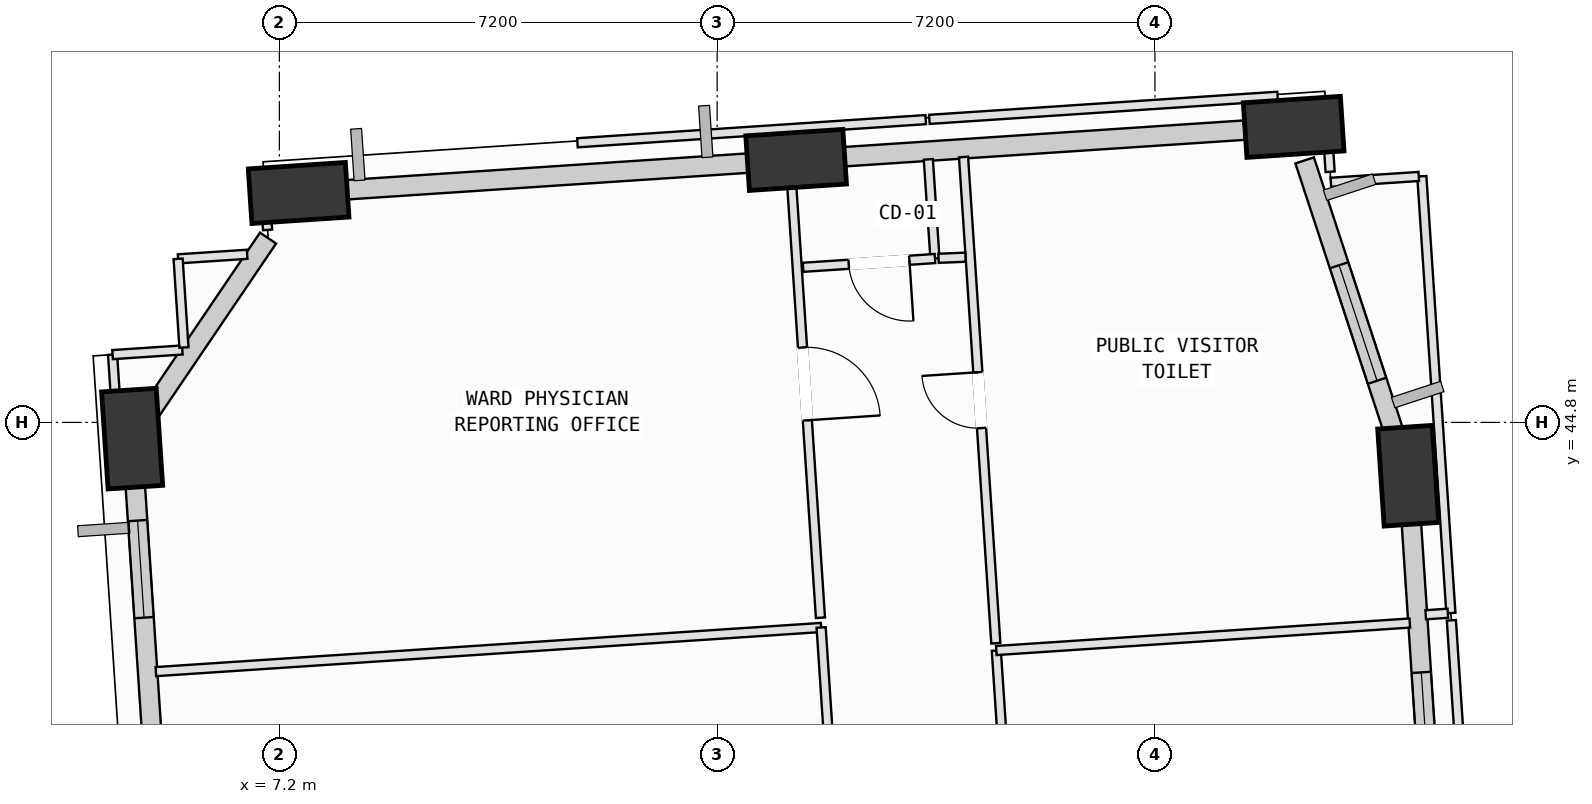
"""IFC4 building model, lengths in metres.
Left out: names, types, materials, properties, quantities, classifications, styles, units other than length and angle.
Written with IfcOpenShell. Run it as: python <this file> out.ifc"""

import sys

from ifc_helpers import new_model, si_unit, direction, frame, frame_2d, origin, origin_2d, place, context, subcontext, project, spatial, rectangle, extrude, element, fill, save


model = new_model("IFC4")
c1 = context("Model", 3, precision=1e-05, world=origin(), true_north=direction((0.0, 1.0)))
c2 = subcontext(c1, "Body", "Model", "MODEL_VIEW")
j1 = project(units=[si_unit("LENGTHUNIT", "METRE"), si_unit("PLANEANGLEUNIT", "RADIAN")], contexts=[c1])
p1 = place(None, origin())
s1 = spatial("IfcSite", under=j1, at=p1, CompositionType="ELEMENT")
p2 = place(p1, origin())
s2 = spatial("IfcBuilding", under=s1, at=p2, CompositionType="ELEMENT")
p3 = place(p2, frame((0.0, 0.0, 39.0)))
s3 = spatial("IfcBuildingStorey", under=s2, at=p3, CompositionType="ELEMENT", Elevation=39.0)
p4 = place(p3, frame((25.765, 43.923, 0.002), z_axis=(-0.078697694353, -0.033049379763, 0.996350546445), x_axis=(0.890951953445, 0.446039267367, 0.08516800232)))
e1 = element("IfcColumn", 1, at=p4, inside=s3, PredefinedType="COLUMN", context=c2, shape_type="SweptSolid", body=[
    extrude(rectangle(XDim=1.6, YDim=0.9, at=origin_2d()), origin(), (0.0, 0.0, 1.0), 4.011),
])
p5 = place(p3, frame((23.881, 49.66, 0.002), z_axis=(-0.102065358424, -0.040862573599, 0.993938082925), x_axis=(0.432012401952, -0.901838231222, 0.007286238123)))
e2 = element("IfcColumn", 2, at=p5, inside=s3, PredefinedType="COLUMN", context=c2, shape_type="SweptSolid", body=[
    extrude(rectangle(XDim=1.6, YDim=0.9, at=origin_2d()), origin(), (0.0, 0.0, 1.0), 4.021),
])
p6 = place(p3, frame((15.699, 49.117, 0.002), z_axis=(-0.099407727079, -0.074434566374, 0.992258836759), x_axis=(0.650696804167, -0.759293046403, 0.008230354175)))
e3 = element("IfcColumn", 3, at=p6, inside=s3, PredefinedType="COLUMN", context=c2, shape_type="SweptSolid", body=[
    extrude(rectangle(XDim=1.6, YDim=0.9, at=origin_2d()), origin(), (0.0, 0.0, 1.0), 4.028),
])
p7 = place(p3, frame((7.517, 48.573, 0.002), z_axis=(-0.096589910921, -0.107772097103, 0.989472366564), x_axis=(0.786813433781, -0.617116380957, 0.009591286496)))
e4 = element("IfcColumn", 4, at=p7, inside=s3, PredefinedType="COLUMN", context=c2, shape_type="SweptSolid", body=[
    extrude(rectangle(XDim=1.6, YDim=0.9, at=origin_2d()), origin(), (0.0, 0.0, 1.0), 4.039),
])
p8 = place(p3, frame((4.779, 44.533, 0.002), z_axis=(-0.079984869676, -0.118858846397, 0.989684290699), x_axis=(0.496340655848, 0.856277466215, 0.142950530621)))
e5 = element("IfcColumn", 5, at=p8, inside=s3, PredefinedType="COLUMN", context=c2, shape_type="SweptSolid", body=[
    extrude(rectangle(XDim=1.6, YDim=0.9, at=origin_2d()), origin(), (0.0, 0.0, 1.0), 4.038),
])
p9 = place(p3, frame((26.127, 38.477, 0.0), z_axis=(0.0, 0.0, 1.0), x_axis=(-0.066303684838, 0.997799489565, 0.0)))
e6 = element("IfcWall", 6, at=p9, inside=s3, PredefinedType="SOLIDWALL", context=c2, shape_type="SweptSolid", body=[
    extrude(rectangle(XDim=4.816, YDim=0.32, at=frame_2d((2.408, 0.0))), origin(), (0.0, 0.0, 1.0), 3.165),
])
p10 = place(p9, frame((0.616, 0.0, 0.75)))
e7 = element("IfcOpeningElement", 7, at=p10, cuts=e6, PredefinedType="OPENING", context=c2, shape_type="SweptSolid", body=[
    extrude(rectangle(XDim=1.6, YDim=1.95, at=frame_2d((0.8, 0.975))), frame((0.0, 0.17, 0.0), z_axis=(0.0, -1.0, 0.0), x_axis=(1.0, 0.0, 0.0)), (0.0, 0.0, 1.0), 0.34),
])
p11 = place(p3, frame((24.062, 49.109, 0.0), z_axis=(0.0, 0.0, 1.0), x_axis=(0.312045120055, -0.950067283433, 0.0)))
e8 = element("IfcWall", 8, at=p11, inside=s3, PredefinedType="SOLIDWALL", context=c2, shape_type="SweptSolid", body=[
    extrude(rectangle(XDim=4.889, YDim=0.32, at=frame_2d((2.445, 0.0))), origin(), (0.0, 0.0, 1.0), 3.165),
])
p12 = place(p11, frame((1.815, 0.0, 0.75)))
e9 = element("IfcOpeningElement", 9, at=p12, cuts=e8, PredefinedType="OPENING", context=c2, shape_type="SweptSolid", body=[
    extrude(rectangle(XDim=2.0, YDim=1.95, at=frame_2d((1.0, 0.975))), frame((0.0, 0.17, 0.0), z_axis=(0.0, -1.0, 0.0), x_axis=(1.0, 0.0, 0.0)), (0.0, 0.0, 1.0), 0.34),
])
p13 = place(p3, frame((16.081, 49.142, 0.0), z_axis=(0.0, 0.0, 1.0), x_axis=(0.997799173188, 0.066308445806, 0.0)))
e10 = element("IfcWall", 10, at=p13, inside=s3, PredefinedType="SOLIDWALL", context=c2, shape_type="SweptSolid", body=[
    extrude(rectangle(XDim=7.003, YDim=0.32, at=frame_2d((3.501, 0.0))), origin(), (0.0, 0.0, 1.0), 3.165),
])
p14 = place(p3, frame((7.879, 48.598, 0.0), z_axis=(0.0, 0.0, 1.0), x_axis=(0.997800640447, 0.066286363022, 0.0)))
e11 = element("IfcWall", 11, at=p14, inside=s3, PredefinedType="SOLIDWALL", context=c2, shape_type="SweptSolid", body=[
    extrude(rectangle(XDim=7.035, YDim=0.32, at=frame_2d((3.517, 0.0))), origin(), (0.0, 0.0, 1.0), 3.165),
])
p15 = place(p3, frame((4.958, 44.797, 0.0), z_axis=(0.0, 0.0, 1.0), x_axis=(0.561016004543, 0.827804954471, 0.0)))
e12 = element("IfcWall", 12, at=p15, inside=s3, PredefinedType="SOLIDWALL", context=c2, shape_type="SweptSolid", body=[
    extrude(rectangle(XDim=3.666, YDim=0.32, at=frame_2d((1.833, 0.0))), origin(), (0.0, 0.0, 1.0), 3.165),
])
p16 = place(p3, frame((5.179, 38.513, 0.0), z_axis=(0.0, 0.0, 1.0), x_axis=(-0.066280128143, 0.997801054626, 0.0)))
e13 = element("IfcWall", 13, at=p16, inside=s3, PredefinedType="SOLIDWALL", context=c2, shape_type="SweptSolid", body=[
    extrude(rectangle(XDim=5.223, YDim=0.32, at=frame_2d((2.612, 0.0))), origin(), (0.0, 0.0, 1.0), 3.165),
])
p17 = place(p16, frame((3.083, 0.0, 0.75)))
e14 = element("IfcOpeningElement", 14, at=p17, cuts=e13, PredefinedType="OPENING", context=c2, shape_type="SweptSolid", body=[
    extrude(rectangle(XDim=1.6, YDim=1.95, at=frame_2d((0.8, 0.975))), frame((0.0, 0.17, 0.0), z_axis=(0.0, -1.0, 0.0), x_axis=(1.0, 0.0, 0.0)), (0.0, 0.0, 1.0), 0.34),
])
p18 = place(p3, frame((5.169, 40.701, 0.0), z_axis=(0.0, 0.0, 1.0), x_axis=(0.997805307983, 0.066216065736, 0.0)))
e15 = element("IfcWall", 15, at=p18, inside=s3, PredefinedType="PARTITIONING", context=c2, shape_type="SweptSolid", body=[
    extrude(rectangle(XDim=10.965, YDim=0.15, at=frame_2d((5.483, 0.0))), origin(), (0.0, 0.0, 1.0), 3.78),
])
p19 = place(p3, frame((16.11, 41.427, 0.0), z_axis=(0.0, 0.0, 1.0), x_axis=(0.066170320126, -0.997808342686, 0.0)))
e16 = element("IfcWall", 16, at=p19, inside=s3, PredefinedType="PARTITIONING", context=c2, shape_type="SweptSolid", body=[
    extrude(rectangle(XDim=8.04, YDim=0.15, at=frame_2d((4.02, 0.0))), origin(), (0.0, 0.0, 1.0), 3.78),
])
p20 = place(p19, frame((3.42, 0.0, 0.0)))
e17 = element("IfcOpeningElement", 17, at=p20, cuts=e16, PredefinedType="OPENING", context=c2, shape_type="SweptSolid", body=[
    extrude(rectangle(XDim=1.2, YDim=2.15, at=frame_2d((0.6, 1.075))), frame((0.0, 0.085, 0.0), z_axis=(0.0, -1.0, 0.0), x_axis=(1.0, 0.0, 0.0)), (0.0, 0.0, 1.0), 0.17),
])
p21 = place(p3, frame((5.535, 47.49, 0.0), z_axis=(0.0, 0.0, 1.0), x_axis=(0.997826747849, 0.065892194362, 0.0)))
e18 = element("IfcWall", 18, at=p21, inside=s3, PredefinedType="PARTITIONING", context=c2, shape_type="SweptSolid", body=[
    extrude(rectangle(XDim=1.137, YDim=0.15, at=frame_2d((0.569, 0.0))), origin(), (0.0, 0.0, 1.0), 3.78),
])
p22 = place(p3, frame((7.006, 47.966, 0.0), z_axis=(0.0, 0.0, 1.0), x_axis=(-0.066082585029, 0.997814157023, 0.0)))
e19 = element("IfcWall", 19, at=p22, inside=s3, PredefinedType="PARTITIONING", context=c2, shape_type="SweptSolid", body=[
    extrude(rectangle(XDim=0.743, YDim=0.15, at=frame_2d((0.371, 0.0))), origin(), (0.0, 0.0, 1.0), 3.78),
])
p23 = place(p3, frame((6.957, 48.707, 0.0), z_axis=(0.0, 0.0, 1.0), x_axis=(0.997833411032, 0.065791213914, 0.0)))
e20 = element("IfcWall", 20, at=p23, inside=s3, PredefinedType="PARTITIONING", context=c2, shape_type="SweptSolid", body=[
    extrude(rectangle(XDim=0.913, YDim=0.15, at=frame_2d((0.457, 0.0))), origin(), (0.0, 0.0, 1.0), 3.78),
])
p24 = place(p3, frame((14.887, 49.233, 0.0), z_axis=(0.0, 0.0, 1.0), x_axis=(0.997748098839, 0.067072582054, 0.0)))
e21 = element("IfcWall", 21, at=p24, inside=s3, PredefinedType="PARTITIONING", context=c2, shape_type="SweptSolid", body=[
    extrude(rectangle(XDim=0.702, YDim=0.15, at=frame_2d((0.351, 0.0))), origin(), (0.0, 0.0, 1.0), 3.78),
])
p25 = place(p3, frame((15.588, 49.28, 0.0), z_axis=(0.0, 0.0, 1.0), x_axis=(0.066306740692, -0.997799286499, 0.0)))
e22 = element("IfcWall", 22, at=p25, inside=s3, PredefinedType="PARTITIONING", context=c2, shape_type="SweptSolid", body=[
    extrude(rectangle(XDim=7.71, YDim=0.15, at=frame_2d((3.855, 0.0))), origin(), (0.0, 0.0, 1.0), 2.865),
])
p26 = place(p25, frame((3.255, 0.0, 0.0)))
e23 = element("IfcOpeningElement", 23, at=p26, cuts=e22, PredefinedType="OPENING", context=c2, shape_type="SweptSolid", body=[
    extrude(rectangle(XDim=1.2, YDim=2.15, at=frame_2d((0.6, 1.075))), frame((0.0, 0.085, 0.0), z_axis=(0.0, -1.0, 0.0), x_axis=(1.0, 0.0, 0.0)), (0.0, 0.0, 1.0), 0.17),
])
p27 = place(p3, frame((4.603, 43.709, 0.0), z_axis=(0.0, 0.0, 1.0), x_axis=(-0.066035274338, 0.997817289158, 0.0)))
e24 = element("IfcWall", 24, at=p27, inside=s3, PredefinedType="PARTITIONING", context=c2, shape_type="SweptSolid", body=[
    extrude(rectangle(XDim=2.211, YDim=0.15, at=frame_2d((1.105, 0.0))), origin(), (0.0, 0.0, 1.0), 3.165),
])
p28 = place(p3, frame((4.457, 45.915, 0.0), z_axis=(0.0, 0.0, 1.0), x_axis=(0.997816062356, 0.066053809151, 0.0)))
e25 = element("IfcWall", 25, at=p28, inside=s3, PredefinedType="PARTITIONING", context=c2, shape_type="SweptSolid", body=[
    extrude(rectangle(XDim=1.149, YDim=0.15, at=frame_2d((0.575, 0.0))), origin(), (0.0, 0.0, 1.0), 3.78),
])
p29 = place(p3, frame((5.631, 46.032, 0.0), z_axis=(0.0, 0.0, 1.0), x_axis=(-0.065831433156, 0.9978307584, 0.0)))
e26 = element("IfcWall", 26, at=p29, inside=s3, PredefinedType="PARTITIONING", context=c2, shape_type="SweptSolid", body=[
    extrude(rectangle(XDim=1.461, YDim=0.15, at=frame_2d((0.73, 0.0))), origin(), (0.0, 0.0, 1.0), 3.78),
])
p30 = place(p3, frame((19.544, 32.726, 0.0), z_axis=(0.0, 0.0, 1.0), x_axis=(-0.066301410689, 0.99779964068, 0.0)))
e27 = element("IfcWall", 27, at=p30, inside=s3, PredefinedType="PARTITIONING", context=c2, shape_type="SweptSolid", body=[
    extrude(rectangle(XDim=8.34, YDim=0.15, at=frame_2d((4.17, 0.0))), origin(), (0.0, 0.0, 1.0), 3.78),
])
p31 = place(p30, frame((3.71, 0.0, 0.0)))
e28 = element("IfcOpeningElement", 28, at=p31, cuts=e27, PredefinedType="OPENING", context=c2, shape_type="SweptSolid", body=[
    extrude(rectangle(XDim=0.92, YDim=2.1, at=frame_2d((0.46, 1.05))), frame((0.0, 0.085, 0.0), z_axis=(0.0, -1.0, 0.0), x_axis=(1.0, 0.0, 0.0)), (0.0, 0.0, 1.0), 0.17),
])
p32 = place(p3, frame((18.991, 41.048, 0.0), z_axis=(0.0, 0.0, 1.0), x_axis=(0.997799084991, 0.066309772962, 0.0)))
e29 = element("IfcWall", 29, at=p32, inside=s3, PredefinedType="PARTITIONING", context=c2, shape_type="SweptSolid", body=[
    extrude(rectangle(XDim=6.815, YDim=0.15, at=frame_2d((3.407, 0.0))), origin(), (0.0, 0.0, 1.0), 3.78),
])
p33 = place(p3, frame((26.475, 41.545, 0.0), z_axis=(0.0, 0.0, 1.0), x_axis=(0.066184835455, -0.997807379987, 0.0)))
e30 = element("IfcWall", 30, at=p33, inside=s3, PredefinedType="PARTITIONING", context=c2, shape_type="SweptSolid", body=[
    extrude(rectangle(XDim=8.34, YDim=0.15, at=frame_2d((4.17, 0.0))), origin(), (0.0, 0.0, 1.0), 3.78),
])
p34 = place(p3, frame((25.989, 48.848, 0.0), z_axis=(0.0, 0.0, 1.0), x_axis=(0.066395224543, -0.997793402543, 0.0)))
e31 = element("IfcWall", 31, at=p34, inside=s3, PredefinedType="PARTITIONING", context=c2, shape_type="SweptSolid", body=[
    extrude(rectangle(XDim=7.2, YDim=0.15, at=frame_2d((3.6, 0.0))), origin(), (0.0, 0.0, 1.0), 3.78),
])
p35 = place(p3, frame((26.417, 41.661, 0.0), z_axis=(0.0, 0.0, 1.0), x_axis=(-0.99766818576, -0.068250942285, 0.0)))
e32 = element("IfcWall", 32, at=p35, inside=s3, PredefinedType="PARTITIONING", context=c2, shape_type="SweptSolid", body=[
    extrude(rectangle(XDim=0.365, YDim=0.15, at=frame_2d((0.182, 0.0))), origin(), (0.0, 0.0, 1.0), 3.78),
])
p36 = place(p3, frame((18.983, 41.167, 0.0), z_axis=(0.0, 0.0, 1.0), x_axis=(-0.066246099174, 0.997803314458, 0.0)))
e33 = element("IfcWall", 33, at=p36, inside=s3, PredefinedType="PARTITIONING", context=c2, shape_type="SweptSolid", body=[
    extrude(rectangle(XDim=8.016, YDim=0.15, at=frame_2d((4.008, 0.0))), origin(), (0.0, 0.0, 1.0), 3.78),
])
p37 = place(p36, frame((3.548, 0.0, 0.0)))
e34 = element("IfcOpeningElement", 34, at=p37, cuts=e33, PredefinedType="OPENING", context=c2, shape_type="SweptSolid", body=[
    extrude(rectangle(XDim=0.92, YDim=2.1, at=frame_2d((0.46, 1.05))), frame((0.0, 0.085, 0.0), z_axis=(0.0, -1.0, 0.0), x_axis=(1.0, 0.0, 0.0)), (0.0, 0.0, 1.0), 0.17),
])
p38 = place(p3, frame((23.056, 49.797, 0.0), z_axis=(0.0, 0.0, 1.0), x_axis=(0.997828501674, 0.065865630245, 0.0)))
e35 = element("IfcWall", 35, at=p38, inside=s3, PredefinedType="PARTITIONING", context=c2, shape_type="SweptSolid", body=[
    extrude(rectangle(XDim=1.364, YDim=0.15, at=frame_2d((0.682, 0.0))), origin(), (0.0, 0.0, 1.0), 3.165),
])
p39 = place(p3, frame((24.42, 49.837, 0.0), z_axis=(0.0, 0.0, 1.0), x_axis=(0.066572032403, -0.99778162165, 0.0)))
e36 = element("IfcWall", 36, at=p39, inside=s3, PredefinedType="PARTITIONING", context=c2, shape_type="SweptSolid", body=[
    extrude(rectangle(XDim=0.917, YDim=0.15, at=frame_2d((0.458, 0.0))), origin(), (0.0, 0.0, 1.0), 3.78),
])
p40 = place(p3, frame((24.493, 48.749, 0.0), z_axis=(0.0, 0.0, 1.0), x_axis=(0.997805980255, 0.066205934533, 0.0)))
e37 = element("IfcWall", 37, at=p40, inside=s3, PredefinedType="PARTITIONING", context=c2, shape_type="SweptSolid", body=[
    extrude(rectangle(XDim=1.449, YDim=0.15, at=frame_2d((0.725, 0.0))), origin(), (0.0, 0.0, 1.0), 3.78),
])
p41 = place(p3, frame((12.102, 49.399, 0.0), z_axis=(0.0, 0.0, 1.0), x_axis=(0.997793993374, 0.066386344883, 0.0)))
e38 = element("IfcWall", 38, at=p41, inside=s3, PredefinedType="PARTITIONING", context=c2, shape_type="SweptSolid", body=[
    extrude(rectangle(XDim=5.741, YDim=0.15, at=frame_2d((2.87, 0.0))), origin(), (0.0, 0.0, 1.0), 3.78),
])
p42 = place(p3, frame((17.873, 49.126, 0.0), z_axis=(0.0, 0.0, 1.0), x_axis=(0.066618148279, -0.997778543726, 0.0)))
e39 = element("IfcWall", 39, at=p42, inside=s3, PredefinedType="PARTITIONING", context=c2, shape_type="SweptSolid", body=[
    extrude(rectangle(XDim=1.635, YDim=0.15, at=frame_2d((0.817, 0.0))), origin(), (0.0, 0.0, 1.0), 3.78),
])
p43 = place(p3, frame((17.982, 47.495, 0.0), z_axis=(0.0, 0.0, 1.0), x_axis=(-0.997802022538, -0.066265555301, 0.0)))
e40 = element("IfcWall", 40, at=p43, inside=s3, PredefinedType="PARTITIONING", context=c2, shape_type="SweptSolid", body=[
    extrude(rectangle(XDim=2.174, YDim=0.15, at=frame_2d((1.087, 0.0))), origin(), (0.0, 0.0, 1.0), 3.78),
])
p44 = place(p43, frame((0.421, 0.0, 0.0)))
e41 = element("IfcOpeningElement", 41, at=p44, cuts=e40, PredefinedType="OPENING", context=c2, shape_type="SweptSolid", body=[
    extrude(rectangle(XDim=1.0, YDim=2.12, at=frame_2d((0.5, 1.06))), frame((0.0, 0.085, 0.0), z_axis=(0.0, -1.0, 0.0), x_axis=(1.0, 0.0, 0.0)), (0.0, 0.0, 1.0), 0.17),
])
p45 = place(p3, frame((18.484, 47.517, 0.0), z_axis=(0.0, 0.0, 1.0), x_axis=(-0.999168968956, -0.040759924864, 0.0)))
e42 = element("IfcWall", 42, at=p45, inside=s3, PredefinedType="PARTITIONING", context=c2, shape_type="SweptSolid", body=[
    extrude(rectangle(XDim=0.443, YDim=0.15, at=frame_2d((0.222, 0.0))), origin(), (0.0, 0.0, 1.0), 3.78),
])
p46 = place(p3, frame((17.89, 49.784, 0.0), z_axis=(0.0, 0.0, 1.0), x_axis=(0.997804501264, 0.066228221011, 0.0)))
e43 = element("IfcWall", 43, at=p46, inside=s3, PredefinedType="PARTITIONING", context=c2, shape_type="SweptSolid", body=[
    extrude(rectangle(XDim=5.74, YDim=0.15, at=frame_2d((2.87, 0.0))), origin(), (0.0, 0.0, 1.0), 3.78),
])
p47 = place(p10, origin())
e44 = element("IfcWindow", 44, at=p47, inside=s3, PartitioningType="SINGLE_PANEL", PredefinedType="WINDOW", context=c2, shape_type="SweptSolid", body=[
    extrude(rectangle(XDim=1.6, YDim=1.95, at=frame_2d((0.8, 0.975))), frame((0.0, 0.03, 0.0), z_axis=(0.0, -1.0, 0.0), x_axis=(1.0, 0.0, 0.0)), (0.0, 0.0, 1.0), 0.06),
])
fill(e7, e44)
p48 = place(p12, origin())
e45 = element("IfcWindow", 45, at=p48, inside=s3, PartitioningType="SINGLE_PANEL", PredefinedType="WINDOW", context=c2, shape_type="SweptSolid", body=[
    extrude(rectangle(XDim=2.0, YDim=1.95, at=frame_2d((1.0, 0.975))), frame((0.0, 0.03, 0.0), z_axis=(0.0, -1.0, 0.0), x_axis=(1.0, 0.0, 0.0)), (0.0, 0.0, 1.0), 0.06),
])
fill(e9, e45)
p49 = place(p17, origin())
e46 = element("IfcWindow", 46, at=p49, inside=s3, PartitioningType="SINGLE_PANEL", PredefinedType="WINDOW", context=c2, shape_type="SweptSolid", body=[
    extrude(rectangle(XDim=1.6, YDim=1.95, at=frame_2d((0.8, 0.975))), frame((0.0, 0.03, 0.0), z_axis=(0.0, -1.0, 0.0), x_axis=(1.0, 0.0, 0.0)), (0.0, 0.0, 1.0), 0.06),
])
fill(e14, e46)
p50 = place(p26, origin())
e47 = element("IfcDoor", 47, at=p50, inside=s3, OperationType="SINGLE_SWING_RIGHT", PredefinedType="DOOR", context=c2, shape_type="SweptSolid", body=[
    extrude(rectangle(XDim=1.2, YDim=2.15, at=frame_2d((0.6, 1.075))), frame((0.0, 0.025, 0.0), z_axis=(0.0, -1.0, 0.0), x_axis=(1.0, 0.0, 0.0)), (0.0, 0.0, 1.0), 0.05),
])
fill(e23, e47)
p51 = place(p37, origin())
e48 = element("IfcDoor", 48, at=p51, inside=s3, OperationType="SINGLE_SWING_RIGHT", PredefinedType="DOOR", context=c2, shape_type="SweptSolid", body=[
    extrude(rectangle(XDim=0.92, YDim=2.1, at=frame_2d((0.46, 1.05))), frame((0.0, 0.025, 0.0), z_axis=(0.0, -1.0, 0.0), x_axis=(1.0, 0.0, 0.0)), (0.0, 0.0, 1.0), 0.05),
])
fill(e34, e48)
p52 = place(p44, origin())
e49 = element("IfcDoor", 49, at=p52, inside=s3, OperationType="SINGLE_SWING_LEFT", PredefinedType="DOOR", context=c2, shape_type="SweptSolid", body=[
    extrude(rectangle(XDim=1.0, YDim=2.12, at=frame_2d((0.5, 1.06))), frame((0.0, 0.025, 0.0), z_axis=(0.0, -1.0, 0.0), x_axis=(1.0, 0.0, 0.0)), (0.0, 0.0, 1.0), 0.05),
])
fill(e41, e49)
save(model, sys.argv[1])
